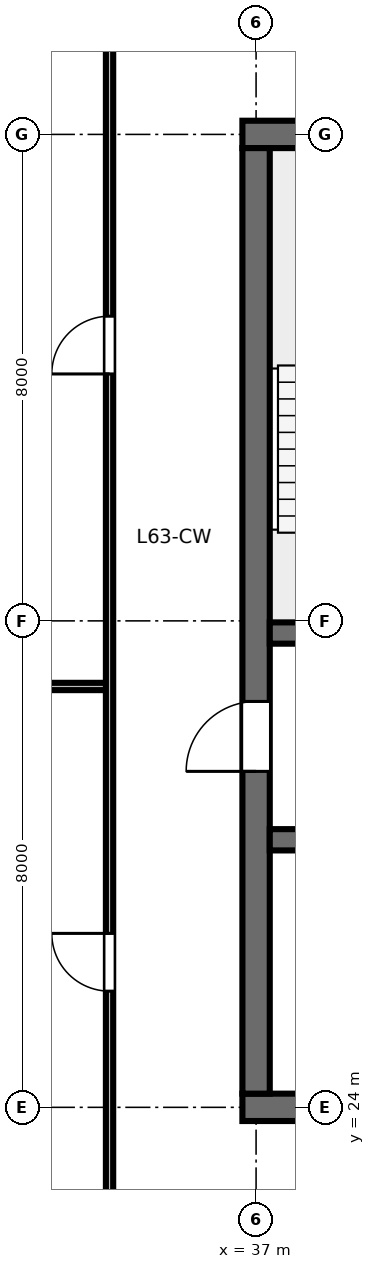
"""IFC4 building model, lengths in metres.
Left out: names, types, materials, properties, quantities, classifications, styles, units other than length and angle.
Written with IfcOpenShell. Run it as: python <this file> out.ifc"""

import sys

from ifc_helpers import new_model, si_unit, direction, frame, frame_2d, origin, place, context, subcontext, project, spatial, rectangle, extrude, element, fill, save


model = new_model("IFC4")
c1 = context("Model", 3, precision=1e-05, world=origin(), true_north=direction((0.0, 1.0)))
c2 = subcontext(c1, "Body", "Model", "MODEL_VIEW")
j1 = project(units=[si_unit("LENGTHUNIT", "METRE"), si_unit("PLANEANGLEUNIT", "RADIAN")], contexts=[c1])
p1 = place(None, origin())
s1 = spatial("IfcSite", under=j1, at=p1, CompositionType="ELEMENT")
p2 = place(p1, origin())
s2 = spatial("IfcBuilding", under=s1, at=p2, CompositionType="ELEMENT")
p3 = place(p2, frame((0.0, 0.0, 239.4)))
s3 = spatial("IfcBuildingStorey", under=s2, at=p3, CompositionType="ELEMENT", Elevation=239.4)
p4 = place(p3, frame((36.775, 24.0, 0.0), z_axis=(0.0, 0.0, 1.0), x_axis=(1.0, 0.0, 0.0)))
e1 = element("IfcWall", 1, at=p4, inside=s3, PredefinedType="SHEAR", context=c2, shape_type="SweptSolid", body=[
    extrude(rectangle(XDim=18.45, YDim=0.45, at=frame_2d((9.225, 0.0))), origin(), (0.0, 0.0, 1.0), 3.36),
])
p5 = place(p4, frame((13.425, 0.0, 0.0)))
e2 = element("IfcOpeningElement", 2, at=p5, cuts=e1, PredefinedType="OPENING", context=c2, shape_type="SweptSolid", body=[
    extrude(rectangle(XDim=1.6, YDim=2.15, at=frame_2d((0.8, 1.075))), frame((0.0, 0.235, 0.0), z_axis=(0.0, -1.0, 0.0), x_axis=(1.0, 0.0, 0.0)), (0.0, 0.0, 1.0), 0.47),
])
p6 = place(p3, frame((36.775, 40.0, 0.0), z_axis=(0.0, 0.0, 1.0), x_axis=(1.0, 0.0, 0.0)))
e3 = element("IfcWall", 3, at=p6, inside=s3, PredefinedType="SHEAR", context=c2, shape_type="SweptSolid", body=[
    extrude(rectangle(XDim=18.45, YDim=0.45, at=frame_2d((9.225, 0.0))), origin(), (0.0, 0.0, 1.0), 3.36),
])
p7 = place(p6, frame((8.725, 0.0, 0.0)))
e4 = element("IfcOpeningElement", 4, at=p7, cuts=e3, PredefinedType="OPENING", context=c2, shape_type="SweptSolid", body=[
    extrude(rectangle(XDim=1.0, YDim=2.15, at=frame_2d((0.5, 1.075))), frame((0.0, 0.235, 0.0), z_axis=(0.0, -1.0, 0.0), x_axis=(1.0, 0.0, 0.0)), (0.0, 0.0, 1.0), 0.47),
])
p8 = place(p3, frame((37.0, 24.225, 0.0), z_axis=(0.0, 0.0, 1.0), x_axis=(0.0, 1.0, 0.0)))
e5 = element("IfcWall", 5, at=p8, inside=s3, PredefinedType="SHEAR", context=c2, shape_type="SweptSolid", body=[
    extrude(rectangle(XDim=15.55, YDim=0.45, at=frame_2d((7.775, 0.0))), origin(), (0.0, 0.0, 1.0), 3.36),
])
p9 = place(p8, frame((5.3, 0.0, 0.0)))
e6 = element("IfcOpeningElement", 6, at=p9, cuts=e5, PredefinedType="OPENING", context=c2, shape_type="SweptSolid", body=[
    extrude(rectangle(XDim=1.15, YDim=2.15, at=frame_2d((0.575, 1.075))), frame((0.0, 0.235, 0.0), z_axis=(0.0, -1.0, 0.0), x_axis=(1.0, 0.0, 0.0)), (0.0, 0.0, 1.0), 0.47),
])
p10 = place(p3, frame((37.225, 31.8, 0.0), z_axis=(0.0, 0.0, 1.0), x_axis=(1.0, 0.0, 0.0)))
e7 = element("IfcWall", 7, at=p10, inside=s3, PredefinedType="SHEAR", context=c2, shape_type="SweptSolid", body=[
    extrude(rectangle(XDim=17.55, YDim=0.35, at=frame_2d((8.775, 0.0))), origin(), (0.0, 0.0, 1.0), 3.36),
])
p11 = place(p10, frame((0.825, 0.0, 0.0)))
e8 = element("IfcOpeningElement", 8, at=p11, cuts=e7, PredefinedType="OPENING", context=c2, shape_type="SweptSolid", body=[
    extrude(rectangle(XDim=1.1, YDim=2.15, at=frame_2d((0.55, 1.075))), frame((0.0, 0.185, 0.0), z_axis=(0.0, -1.0, 0.0), x_axis=(1.0, 0.0, 0.0)), (0.0, 0.0, 1.0), 0.37),
])
p12 = place(p10, frame((14.725, 0.0, 0.0)))
e9 = element("IfcOpeningElement", 9, at=p12, cuts=e7, PredefinedType="OPENING", context=c2, shape_type="SweptSolid", body=[
    extrude(rectangle(XDim=1.1, YDim=2.15, at=frame_2d((0.55, 1.075))), frame((0.0, 0.185, 0.0), z_axis=(0.0, -1.0, 0.0), x_axis=(1.0, 0.0, 0.0)), (0.0, 0.0, 1.0), 0.37),
])
p13 = place(p3, frame((37.225, 28.4, 0.0), z_axis=(0.0, 0.0, 1.0), x_axis=(1.0, 0.0, 0.0)))
e10 = element("IfcWall", 10, at=p13, inside=s3, PredefinedType="SHEAR", context=c2, shape_type="SweptSolid", body=[
    extrude(rectangle(XDim=17.55, YDim=0.35, at=frame_2d((8.775, 0.0))), origin(), (0.0, 0.0, 1.0), 3.36),
])
p14 = place(p3, frame((34.59, 30.921, 0.0), z_axis=(0.0, 0.0, 1.0), x_axis=(-1.0, 0.0, 0.0)))
e11 = element("IfcWall", 11, at=p14, inside=s3, PredefinedType="PARTITIONING", context=c2, shape_type="SweptSolid", body=[
    extrude(rectangle(XDim=7.16, YDim=0.12, at=frame_2d((3.58, 0.0))), origin(), (0.0, 0.0, 1.0), 2.655),
])
p15 = place(p14, frame((1.4, 0.0, 0.0)))
e12 = element("IfcOpeningElement", 12, at=p15, cuts=e11, PredefinedType="OPENING", context=c2, shape_type="SweptSolid", body=[
    extrude(rectangle(XDim=0.9, YDim=2.15, at=frame_2d((0.45, 1.075))), frame((0.0, 0.07, 0.0), z_axis=(0.0, -1.0, 0.0), x_axis=(1.0, 0.0, 0.0)), (0.0, 0.0, 1.0), 0.14),
])
p16 = place(p3, frame((34.59, 21.65, 0.0), z_axis=(0.0, 0.0, 1.0), x_axis=(0.0, 1.0, 0.0)))
e13 = element("IfcWall", 13, at=p16, inside=s3, PredefinedType="PARTITIONING", context=c2, shape_type="SweptSolid", body=[
    extrude(rectangle(XDim=20.7, YDim=0.12, at=frame_2d((10.35, 0.0))), origin(), (0.0, 0.0, 1.0), 2.655),
])
p17 = place(p16, frame((4.26, 0.0, 0.0)))
e14 = element("IfcOpeningElement", 14, at=p17, cuts=e13, PredefinedType="OPENING", context=c2, shape_type="SweptSolid", body=[
    extrude(rectangle(XDim=0.95, YDim=2.15, at=frame_2d((0.475, 1.075))), frame((0.0, 0.07, 0.0), z_axis=(0.0, -1.0, 0.0), x_axis=(1.0, 0.0, 0.0)), (0.0, 0.0, 1.0), 0.14),
])
p18 = place(p16, frame((14.411, 0.0, 0.0)))
e15 = element("IfcOpeningElement", 15, at=p18, cuts=e13, PredefinedType="OPENING", context=c2, shape_type="SweptSolid", body=[
    extrude(rectangle(XDim=0.95, YDim=2.15, at=frame_2d((0.475, 1.075))), frame((0.0, 0.07, 0.0), z_axis=(0.0, -1.0, 0.0), x_axis=(1.0, 0.0, 0.0)), (0.0, 0.0, 1.0), 0.14),
])
p19 = place(p9, origin())
e16 = element("IfcDoor", 16, at=p19, inside=s3, OperationType="SINGLE_SWING_LEFT", PredefinedType="DOOR", context=c2, shape_type="SweptSolid", body=[
    extrude(rectangle(XDim=1.15, YDim=2.15, at=frame_2d((0.575, 1.075))), frame((0.0, 0.025, 0.0), z_axis=(0.0, -1.0, 0.0), x_axis=(1.0, 0.0, 0.0)), (0.0, 0.0, 1.0), 0.05),
])
fill(e6, e16)
p20 = place(p17, origin())
e17 = element("IfcDoor", 17, at=p20, inside=s3, OperationType="SINGLE_SWING_RIGHT", PredefinedType="DOOR", context=c2, shape_type="SweptSolid", body=[
    extrude(rectangle(XDim=0.95, YDim=2.15, at=frame_2d((0.475, 1.075))), frame((0.0, 0.025, 0.0), z_axis=(0.0, -1.0, 0.0), x_axis=(1.0, 0.0, 0.0)), (0.0, 0.0, 1.0), 0.05),
])
fill(e14, e17)
p21 = place(p18, origin())
e18 = element("IfcDoor", 18, at=p21, inside=s3, OperationType="SINGLE_SWING_LEFT", PredefinedType="DOOR", context=c2, shape_type="SweptSolid", body=[
    extrude(rectangle(XDim=0.95, YDim=2.15, at=frame_2d((0.475, 1.075))), frame((0.0, 0.025, 0.0), z_axis=(0.0, -1.0, 0.0), x_axis=(1.0, 0.0, 0.0)), (0.0, 0.0, 1.0), 0.05),
])
fill(e15, e18)
save(model, sys.argv[1])
